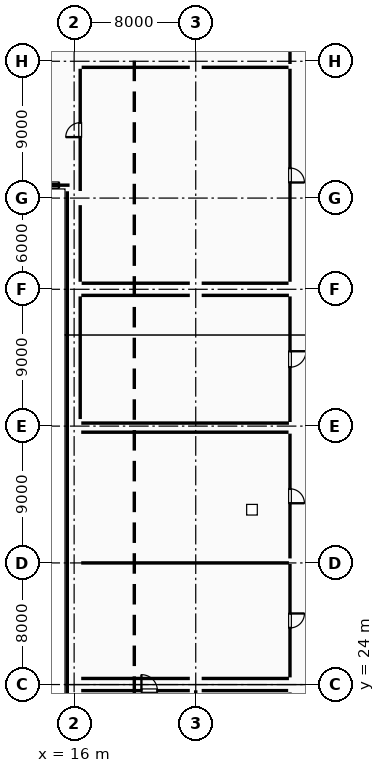
"""IFC4 building model, lengths in metres.
Left out: names, types, materials, properties, quantities, classifications, styles, units other than length and angle.
Written with IfcOpenShell. Run it as: python <this file> out.ifc"""

import sys

from ifc_helpers import new_model, si_unit, direction, frame, frame_2d, origin, origin_2d, place, context, subcontext, project, spatial, rectangle, extrude, element, fill, save


model = new_model("IFC4")
c1 = context("Model", 3, precision=1e-05, world=origin(), true_north=direction((0.0, 1.0)))
c2 = subcontext(c1, "Body", "Model", "MODEL_VIEW")
j1 = project(units=[si_unit("LENGTHUNIT", "METRE"), si_unit("PLANEANGLEUNIT", "RADIAN")], contexts=[c1])
p1 = place(None, origin())
s1 = spatial("IfcSite", under=j1, at=p1, CompositionType="ELEMENT")
p2 = place(p1, origin())
s2 = spatial("IfcBuilding", under=s1, at=p2, CompositionType="ELEMENT")
p3 = place(p2, origin())
s3 = spatial("IfcBuildingStorey", under=s2, at=p3, CompositionType="ELEMENT", Elevation=0.0)
for number, where, z_axis, x_axis in (
    (1, (16.0, 24.0, 0.0), (0.0, 0.0, 1.0), (1.0, 0.0, 0.0)),
    (2, (16.0, 32.0, 0.0), (0.0, 0.0, 1.0), (1.0, 0.0, 0.0)),
    (3, (16.0, 41.0, 0.0), (0.0, 0.0, 1.0), (1.0, 0.0, 0.0)),
    (4, (16.0, 50.0, 0.0), (0.0, 0.0, 1.0), (1.0, 0.0, 0.0)),
    (5, (16.0, 56.0, 0.0), (0.0, 0.0, 1.0), (1.0, 0.0, 0.0)),
    (6, (16.0, 65.0, 0.0), (0.0, 0.0, 1.0), (1.0, 0.0, 0.0)),
):
    element("IfcColumn", number, at=place(p3, frame(where, z_axis=z_axis, x_axis=x_axis)), inside=s3, PredefinedType="COLUMN", context=c2, shape_type="SweptSolid", body=[
        extrude(rectangle(XDim=0.9, YDim=0.9, at=origin_2d()), origin(), (0.0, 0.0, 1.0), 5.4),
    ])
for number, where, z_axis, x_axis in (
    (7, (24.0, 24.0, 0.0), (0.0, 0.0, 1.0), (1.0, 0.0, 0.0)),
    (8, (24.0, 50.0, 0.0), (0.0, 0.0, 1.0), (1.0, 0.0, 0.0)),
    (9, (24.0, 56.0, 0.0), (0.0, 0.0, 1.0), (1.0, 0.0, 0.0)),
    (10, (24.0, 65.0, 0.0), (0.0, 0.0, 1.0), (1.0, 0.0, 0.0)),
):
    element("IfcColumn", number, at=place(p3, frame(where, z_axis=z_axis, x_axis=x_axis)), inside=s3, PredefinedType="COLUMN", context=c2, shape_type="SweptSolid", body=[
        extrude(rectangle(XDim=0.75, YDim=0.75, at=origin_2d()), origin(), (0.0, 0.0, 1.0), 5.4),
    ])
p4 = place(p3, frame((9.1, 56.85, 0.0), z_axis=(0.0, 0.0, 1.0), x_axis=(1.0, 0.0, 0.0)))
e11 = element("IfcWall", 11, at=p4, inside=s3, PredefinedType="STANDARD", context=c2, shape_type="SweptSolid", body=[
    extrude(rectangle(XDim=6.6, YDim=0.4, at=frame_2d((3.3, 0.0))), origin(), (0.0, 0.0, 1.0), 4.85),
])
p5 = place(p4, frame((0.7, 0.0, 0.0)))
e12 = element("IfcOpeningElement", 12, at=p5, cuts=e11, PredefinedType="OPENING", context=c2, shape_type="SweptSolid", body=[
    extrude(rectangle(XDim=5.2, YDim=3.6, at=frame_2d((2.6, 1.8))), frame((0.0, 0.21, 0.0), z_axis=(0.0, -1.0, 0.0), x_axis=(1.0, 0.0, 0.0)), (0.0, 0.0, 1.0), 0.42),
])
p6 = place(p3, frame((15.55, 18.25, 0.0), z_axis=(0.0, 0.0, 1.0), x_axis=(0.0, 1.0, 0.0)))
e13 = element("IfcWall", 13, at=p6, inside=s3, PredefinedType="PARAPET", context=c2, shape_type="SweptSolid", body=[
    extrude(rectangle(XDim=38.2, YDim=0.22, at=frame_2d((19.1, 0.0))), origin(), (0.0, 0.0, 1.0), 1.25),
])
p7 = place(p3, frame((16.495, 64.6, 0.0), z_axis=(0.0, 0.0, 1.0), x_axis=(1.0, 0.0, 0.0)))
e14 = element("IfcWall", 14, at=p7, inside=s3, PredefinedType="PARTITIONING", context=c2, shape_type="SweptSolid", body=[
    extrude(rectangle(XDim=7.115, YDim=0.15, at=frame_2d((3.558, 0.0))), origin(), (0.0, 0.0, 1.0), 4.25),
])
p8 = place(p3, frame((24.39, 64.6, 0.0), z_axis=(0.0, 0.0, 1.0), x_axis=(1.0, 0.0, 0.0)))
e15 = element("IfcWall", 15, at=p8, inside=s3, PredefinedType="PARTITIONING", context=c2, shape_type="SweptSolid", body=[
    extrude(rectangle(XDim=5.715, YDim=0.15, at=frame_2d((2.857, 0.0))), origin(), (0.0, 0.0, 1.0), 4.35),
])
p9 = place(p3, frame((30.2, 64.505, 0.0), z_axis=(0.0, 0.0, 1.0), x_axis=(0.0, -1.0, 0.0)))
e16 = element("IfcWall", 16, at=p9, inside=s3, PredefinedType="PARTITIONING", context=c2, shape_type="SweptSolid", body=[
    extrude(rectangle(XDim=14.01, YDim=0.15, at=frame_2d((7.005, 0.0))), origin(), (0.0, 0.0, 1.0), 5.11),
])
p10 = place(p9, frame((6.53, 0.0, 0.0)))
e17 = element("IfcOpeningElement", 17, at=p10, cuts=e16, PredefinedType="OPENING", context=c2, shape_type="SweptSolid", body=[
    extrude(rectangle(XDim=0.95, YDim=2.15, at=frame_2d((0.475, 1.075))), frame((0.0, 0.085, 0.0), z_axis=(0.0, -1.0, 0.0), x_axis=(1.0, 0.0, 0.0)), (0.0, 0.0, 1.0), 0.17),
])
p11 = place(p3, frame((30.105, 50.4, 0.0), z_axis=(0.0, 0.0, 1.0), x_axis=(-1.0, 0.0, 0.0)))
e18 = element("IfcWall", 18, at=p11, inside=s3, PredefinedType="PARTITIONING", context=c2, shape_type="SweptSolid", body=[
    extrude(rectangle(XDim=5.715, YDim=0.15, at=frame_2d((2.857, 0.0))), origin(), (0.0, 0.0, 1.0), 4.1),
])
p12 = place(p3, frame((23.61, 50.4, 0.0), z_axis=(0.0, 0.0, 1.0), x_axis=(-1.0, 0.0, 0.0)))
e19 = element("IfcWall", 19, at=p12, inside=s3, PredefinedType="PARTITIONING", context=c2, shape_type="SweptSolid", body=[
    extrude(rectangle(XDim=7.115, YDim=0.15, at=frame_2d((3.558, 0.0))), origin(), (0.0, 0.0, 1.0), 5.11),
])
p13 = place(p3, frame((16.4, 50.495, 0.0), z_axis=(0.0, 0.0, 1.0), x_axis=(0.0, 1.0, 0.0)))
e20 = element("IfcWall", 20, at=p13, inside=s3, PredefinedType="PARTITIONING", context=c2, shape_type="SweptSolid", body=[
    extrude(rectangle(XDim=5.04, YDim=0.15, at=frame_2d((2.52, 0.0))), origin(), (0.0, 0.0, 1.0), 5.11),
])
p14 = place(p3, frame((16.4, 56.465, 0.0), z_axis=(0.0, 0.0, 1.0), x_axis=(0.0, 1.0, 0.0)))
e21 = element("IfcWall", 21, at=p14, inside=s3, PredefinedType="PARTITIONING", context=c2, shape_type="SweptSolid", body=[
    extrude(rectangle(XDim=8.04, YDim=0.15, at=frame_2d((4.02, 0.0))), origin(), (0.0, 0.0, 1.0), 5.4),
])
p15 = place(p14, frame((3.545, 0.0, 0.0)))
e22 = element("IfcOpeningElement", 22, at=p15, cuts=e21, PredefinedType="OPENING", context=c2, shape_type="SweptSolid", body=[
    extrude(rectangle(XDim=0.95, YDim=2.15, at=frame_2d((0.475, 1.075))), frame((0.0, 0.085, 0.0), z_axis=(0.0, -1.0, 0.0), x_axis=(1.0, 0.0, 0.0)), (0.0, 0.0, 1.0), 0.17),
])
p16 = place(p3, frame((16.465, 23.6, 0.0), z_axis=(0.0, 0.0, 1.0), x_axis=(1.0, 0.0, 0.0)))
e23 = element("IfcWall", 23, at=p16, inside=s3, PredefinedType="PARTITIONING", context=c2, shape_type="SweptSolid", body=[
    extrude(rectangle(XDim=7.145, YDim=0.2, at=frame_2d((3.573, 0.0))), origin(), (0.0, 0.0, 1.0), 5.11),
])
p17 = place(p16, frame((3.962, 0.0, 0.0)))
e24 = element("IfcOpeningElement", 24, at=p17, cuts=e23, PredefinedType="OPENING", context=c2, shape_type="SweptSolid", body=[
    extrude(rectangle(XDim=1.05, YDim=2.15, at=frame_2d((0.525, 1.075))), frame((0.0, 0.11, 0.0), z_axis=(0.0, -1.0, 0.0), x_axis=(1.0, 0.0, 0.0)), (0.0, 0.0, 1.0), 0.22),
])
p18 = place(p3, frame((24.0, 23.621, 0.0), z_axis=(0.0, 0.0, 1.0), x_axis=(0.0, -1.0, 0.0)))
e25 = element("IfcWall", 25, at=p18, inside=s3, PredefinedType="PARTITIONING", context=c2, shape_type="SweptSolid", body=[
    extrude(rectangle(XDim=2.001, YDim=0.2, at=frame_2d((1.0, 0.0))), origin(), (0.0, 0.0, 1.0), 5.11),
])
p19 = place(p3, frame((24.39, 23.6, 0.0), z_axis=(0.0, 0.0, 1.0), x_axis=(1.0, 0.0, 0.0)))
e26 = element("IfcWall", 26, at=p19, inside=s3, PredefinedType="PARTITIONING", context=c2, shape_type="SweptSolid", body=[
    extrude(rectangle(XDim=5.69, YDim=0.2, at=frame_2d((2.845, 0.0))), origin(), (0.0, 0.0, 1.0), 5.11),
])
p20 = place(p3, frame((30.2, 23.48, 0.0), z_axis=(0.0, 0.0, 1.0), x_axis=(0.0, -1.0, 0.0)))
e27 = element("IfcWall", 27, at=p20, inside=s3, PredefinedType="PARTITIONING", context=c2, shape_type="SweptSolid", body=[
    extrude(rectangle(XDim=7.36, YDim=0.2, at=frame_2d((3.68, 0.0))), origin(), (0.0, 0.0, 1.0), 5.11),
])
p21 = place(p20, frame((0.897, 0.0, 0.0)))
e28 = element("IfcOpeningElement", 28, at=p21, cuts=e27, PredefinedType="OPENING", context=c2, shape_type="SweptSolid", body=[
    extrude(rectangle(XDim=0.95, YDim=2.15, at=frame_2d((0.475, 1.075))), frame((0.0, 0.11, 0.0), z_axis=(0.0, -1.0, 0.0), x_axis=(1.0, 0.0, 0.0)), (0.0, 0.0, 1.0), 0.22),
])
p22 = place(p3, frame((30.2, 73.48, 0.0), z_axis=(0.0, 0.0, 1.0), x_axis=(0.0, -1.0, 0.0)))
e29 = element("IfcWall", 29, at=p22, inside=s3, PredefinedType="PARTITIONING", context=c2, shape_type="SweptSolid", body=[
    extrude(rectangle(XDim=8.66, YDim=0.2, at=frame_2d((4.33, 0.0))), origin(), (0.0, 0.0, 1.0), 5.11),
])
p23 = place(p22, frame((3.805, 0.0, 0.0)))
e30 = element("IfcOpeningElement", 30, at=p23, cuts=e29, PredefinedType="OPENING", context=c2, shape_type="SweptSolid", body=[
    extrude(rectangle(XDim=1.05, YDim=2.15, at=frame_2d((0.525, 1.075))), frame((0.0, 0.11, 0.0), z_axis=(0.0, -1.0, 0.0), x_axis=(1.0, 0.0, 0.0)), (0.0, 0.0, 1.0), 0.22),
])
p24 = place(p3, frame((30.13, 24.4, 0.0), z_axis=(0.0, 0.0, 1.0), x_axis=(-1.0, 0.0, 0.0)))
e31 = element("IfcWall", 31, at=p24, inside=s3, PredefinedType="PARTITIONING", context=c2, shape_type="SweptSolid", body=[
    extrude(rectangle(XDim=5.74, YDim=0.1, at=frame_2d((2.87, 0.0))), origin(), (0.0, 0.0, 1.0), 5.11),
])
p25 = place(p3, frame((23.61, 24.4, 0.0), z_axis=(0.0, 0.0, 1.0), x_axis=(-1.0, 0.0, 0.0)))
e32 = element("IfcWall", 32, at=p25, inside=s3, PredefinedType="PARTITIONING", context=c2, shape_type="SweptSolid", body=[
    extrude(rectangle(XDim=7.145, YDim=0.1, at=frame_2d((3.573, 0.0))), origin(), (0.0, 0.0, 1.0), 5.11),
])
p26 = place(p3, frame((16.465, 32.0, 0.0), z_axis=(0.0, 0.0, 1.0), x_axis=(1.0, 0.0, 0.0)))
e33 = element("IfcWall", 33, at=p26, inside=s3, PredefinedType="PARTITIONING", context=c2, shape_type="SweptSolid", body=[
    extrude(rectangle(XDim=13.665, YDim=0.1, at=frame_2d((6.833, 0.0))), origin(), (0.0, 0.0, 1.0), 4.5),
])
p27 = place(p3, frame((30.2, 31.93, 0.0), z_axis=(0.0, 0.0, 1.0), x_axis=(0.0, -1.0, 0.0)))
e34 = element("IfcWall", 34, at=p27, inside=s3, PredefinedType="PARTITIONING", context=c2, shape_type="SweptSolid", body=[
    extrude(rectangle(XDim=7.46, YDim=0.1, at=frame_2d((3.73, 0.0))), origin(), (0.0, 0.0, 1.0), 5.11),
])
p28 = place(p27, frame((3.255, 0.0, 0.0)))
e35 = element("IfcOpeningElement", 35, at=p28, cuts=e34, PredefinedType="OPENING", context=c2, shape_type="SweptSolid", body=[
    extrude(rectangle(XDim=0.95, YDim=2.15, at=frame_2d((0.475, 1.075))), frame((0.0, 0.06, 0.0), z_axis=(0.0, -1.0, 0.0), x_axis=(1.0, 0.0, 0.0)), (0.0, 0.0, 1.0), 0.12),
])
p29 = place(p3, frame((16.465, 40.6, 0.0), z_axis=(0.0, 0.0, 1.0), x_axis=(1.0, 0.0, 0.0)))
e36 = element("IfcWall", 36, at=p29, inside=s3, PredefinedType="PARTITIONING", context=c2, shape_type="SweptSolid", body=[
    extrude(rectangle(XDim=13.64, YDim=0.15, at=frame_2d((6.82, 0.0))), origin(), (0.0, 0.0, 1.0), 5.11),
])
p30 = place(p3, frame((30.2, 40.505, 0.0), z_axis=(0.0, 0.0, 1.0), x_axis=(0.0, -1.0, 0.0)))
e37 = element("IfcWall", 37, at=p30, inside=s3, PredefinedType="PARTITIONING", context=c2, shape_type="SweptSolid", body=[
    extrude(rectangle(XDim=8.21, YDim=0.15, at=frame_2d((4.105, 0.0))), origin(), (0.0, 0.0, 1.0), 5.11),
])
p31 = place(p30, frame((3.63, 0.0, 0.0)))
e38 = element("IfcOpeningElement", 38, at=p31, cuts=e37, PredefinedType="OPENING", context=c2, shape_type="SweptSolid", body=[
    extrude(rectangle(XDim=0.95, YDim=2.15, at=frame_2d((0.475, 1.075))), frame((0.0, 0.085, 0.0), z_axis=(0.0, -1.0, 0.0), x_axis=(1.0, 0.0, 0.0)), (0.0, 0.0, 1.0), 0.17),
])
p32 = place(p3, frame((16.47, 49.6, 0.0), z_axis=(0.0, 0.0, 1.0), x_axis=(1.0, 0.0, 0.0)))
e39 = element("IfcWall", 39, at=p32, inside=s3, PredefinedType="PARTITIONING", context=c2, shape_type="SweptSolid", body=[
    extrude(rectangle(XDim=7.14, YDim=0.1, at=frame_2d((3.57, 0.0))), origin(), (0.0, 0.0, 1.0), 5.11),
])
p33 = place(p3, frame((24.39, 49.6, 0.0), z_axis=(0.0, 0.0, 1.0), x_axis=(1.0, 0.0, 0.0)))
e40 = element("IfcWall", 40, at=p33, inside=s3, PredefinedType="PARTITIONING", context=c2, shape_type="SweptSolid", body=[
    extrude(rectangle(XDim=5.74, YDim=0.1, at=frame_2d((2.87, 0.0))), origin(), (0.0, 0.0, 1.0), 4.1),
])
p34 = place(p3, frame((30.2, 49.53, 0.0), z_axis=(0.0, 0.0, 1.0), x_axis=(0.0, -1.0, 0.0)))
e41 = element("IfcWall", 41, at=p34, inside=s3, PredefinedType="PARTITIONING", context=c2, shape_type="SweptSolid", body=[
    extrude(rectangle(XDim=8.26, YDim=0.1, at=frame_2d((4.13, 0.0))), origin(), (0.0, 0.0, 1.0), 5.11),
])
p35 = place(p34, frame((3.605, 0.0, 0.0)))
e42 = element("IfcOpeningElement", 42, at=p35, cuts=e41, PredefinedType="OPENING", context=c2, shape_type="SweptSolid", body=[
    extrude(rectangle(XDim=1.05, YDim=2.15, at=frame_2d((0.525, 1.075))), frame((0.0, 0.06, 0.0), z_axis=(0.0, -1.0, 0.0), x_axis=(1.0, 0.0, 0.0)), (0.0, 0.0, 1.0), 0.12),
])
p36 = place(p3, frame((30.13, 41.2, 0.0), z_axis=(0.0, 0.0, 1.0), x_axis=(-1.0, 0.0, 0.0)))
e43 = element("IfcWall", 43, at=p36, inside=s3, PredefinedType="PARTITIONING", context=c2, shape_type="SweptSolid", body=[
    extrude(rectangle(XDim=13.66, YDim=0.1, at=frame_2d((6.83, 0.0))), origin(), (0.0, 0.0, 1.0), 4.5),
])
p37 = place(p3, frame((16.4, 41.465, 0.0), z_axis=(0.0, 0.0, 1.0), x_axis=(0.0, 1.0, 0.0)))
e44 = element("IfcWall", 44, at=p37, inside=s3, PredefinedType="PARTITIONING", context=c2, shape_type="SweptSolid", body=[
    extrude(rectangle(XDim=8.065, YDim=0.1, at=frame_2d((4.032, 0.0))), origin(), (0.0, 0.0, 1.0), 5.11),
])
p38 = place(p5, origin())
e45 = element("IfcDoor", 45, at=p38, inside=s3, OperationType="ROLLINGUP", PredefinedType="GATE", context=c2, shape_type="SweptSolid", body=[
    extrude(rectangle(XDim=5.2, YDim=3.6, at=frame_2d((2.6, 1.8))), frame((0.0, 0.025, 0.0), z_axis=(0.0, -1.0, 0.0), x_axis=(1.0, 0.0, 0.0)), (0.0, 0.0, 1.0), 0.05),
])
fill(e12, e45)
p39 = place(p10, origin())
e46 = element("IfcDoor", 46, at=p39, inside=s3, OperationType="SINGLE_SWING_RIGHT", PredefinedType="DOOR", context=c2, shape_type="SweptSolid", body=[
    extrude(rectangle(XDim=0.95, YDim=2.15, at=frame_2d((0.475, 1.075))), frame((0.0, 0.025, 0.0), z_axis=(0.0, -1.0, 0.0), x_axis=(1.0, 0.0, 0.0)), (0.0, 0.0, 1.0), 0.05),
])
fill(e17, e46)
p40 = place(p17, origin())
e47 = element("IfcDoor", 47, at=p40, inside=s3, OperationType="SINGLE_SWING_LEFT", PredefinedType="DOOR", context=c2, shape_type="SweptSolid", body=[
    extrude(rectangle(XDim=1.05, YDim=2.15, at=frame_2d((0.525, 1.075))), frame((0.0, 0.025, 0.0), z_axis=(0.0, -1.0, 0.0), x_axis=(1.0, 0.0, 0.0)), (0.0, 0.0, 1.0), 0.05),
])
fill(e24, e47)
p41 = place(p15, origin())
e48 = element("IfcDoor", 48, at=p41, inside=s3, OperationType="SINGLE_SWING_LEFT", PredefinedType="DOOR", context=c2, shape_type="SweptSolid", body=[
    extrude(rectangle(XDim=0.95, YDim=2.15, at=frame_2d((0.475, 1.075))), frame((0.0, 0.025, 0.0), z_axis=(0.0, -1.0, 0.0), x_axis=(1.0, 0.0, 0.0)), (0.0, 0.0, 1.0), 0.05),
])
fill(e22, e48)
p42 = place(p28, origin())
e49 = element("IfcDoor", 49, at=p42, inside=s3, OperationType="SINGLE_SWING_LEFT", PredefinedType="DOOR", context=c2, shape_type="SweptSolid", body=[
    extrude(rectangle(XDim=0.95, YDim=2.15, at=frame_2d((0.475, 1.075))), frame((0.0, 0.025, 0.0), z_axis=(0.0, -1.0, 0.0), x_axis=(1.0, 0.0, 0.0)), (0.0, 0.0, 1.0), 0.05),
])
fill(e35, e49)
p43 = place(p31, origin())
e50 = element("IfcDoor", 50, at=p43, inside=s3, OperationType="SINGLE_SWING_RIGHT", PredefinedType="DOOR", context=c2, shape_type="SweptSolid", body=[
    extrude(rectangle(XDim=0.95, YDim=2.15, at=frame_2d((0.475, 1.075))), frame((0.0, 0.025, 0.0), z_axis=(0.0, -1.0, 0.0), x_axis=(1.0, 0.0, 0.0)), (0.0, 0.0, 1.0), 0.05),
])
fill(e38, e50)
p44 = place(p35, origin())
e51 = element("IfcDoor", 51, at=p44, inside=s3, OperationType="SINGLE_SWING_LEFT", PredefinedType="DOOR", context=c2, shape_type="SweptSolid", body=[
    extrude(rectangle(XDim=1.05, YDim=2.15, at=frame_2d((0.525, 1.075))), frame((0.0, 0.025, 0.0), z_axis=(0.0, -1.0, 0.0), x_axis=(1.0, 0.0, 0.0)), (0.0, 0.0, 1.0), 0.05),
])
fill(e42, e51)
save(model, sys.argv[1])
